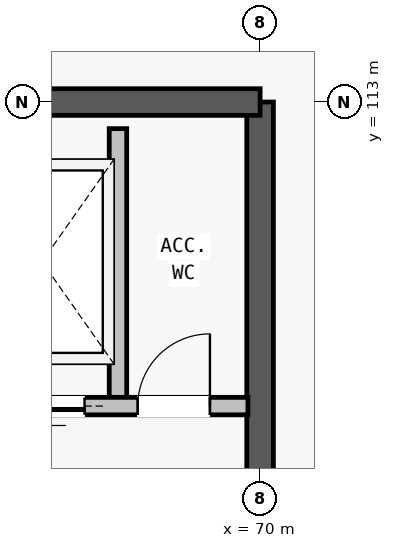
"""IFC4 building model, lengths in metres.
Left out: names, types, materials, properties, quantities, classifications, styles, units other than length and angle.
Written with IfcOpenShell. Run it as: python <this file> out.ifc"""

import sys

from ifc_helpers import new_model, si_unit, direction, frame, frame_2d, origin, place, context, subcontext, project, spatial, rectangle, extrude, element, fill, save


model = new_model("IFC4")
c1 = context("Model", 3, precision=1e-05, world=origin(), true_north=direction((0.0, 1.0)))
c2 = subcontext(c1, "Body", "Model", "MODEL_VIEW")
j1 = project(units=[si_unit("LENGTHUNIT", "METRE"), si_unit("PLANEANGLEUNIT", "RADIAN")], contexts=[c1])
p1 = place(None, origin())
s1 = spatial("IfcSite", under=j1, at=p1, CompositionType="ELEMENT")
p2 = place(p1, origin())
s2 = spatial("IfcBuilding", under=s1, at=p2, CompositionType="ELEMENT")
p3 = place(p2, frame((0.0, 0.0, 17.3)))
s3 = spatial("IfcBuildingStorey", under=s2, at=p3, CompositionType="ELEMENT", Elevation=17.3)
p4 = place(p3, frame((70.0, 104.0, 0.0), z_axis=(0.0, 0.0, 1.0), x_axis=(0.0, 1.0, 0.0)))
e1 = element("IfcWall", 1, at=p4, inside=s3, PredefinedType="SHEAR", context=c2, shape_type="SweptSolid", body=[
    extrude(rectangle(XDim=9.0, YDim=0.35, at=frame_2d((4.5, 0.0))), origin(), (0.0, 0.0, 1.0), 3.62),
])
p5 = place(p4, frame((1.4, 0.0, 0.0)))
e2 = element("IfcOpeningElement", 2, at=p5, cuts=e1, PredefinedType="OPENING", context=c2, shape_type="SweptSolid", body=[
    extrude(rectangle(XDim=1.9, YDim=2.3, at=frame_2d((0.95, 1.15))), frame((0.0, 0.185, 0.0), z_axis=(0.0, -1.0, 0.0), x_axis=(1.0, 0.0, 0.0)), (0.0, 0.0, 1.0), 0.37),
])
p6 = place(p3, frame((70.0, 113.0, 0.0), z_axis=(0.0, 0.0, 1.0), x_axis=(-1.0, 0.0, 0.0)))
e3 = element("IfcWall", 3, at=p6, inside=s3, PredefinedType="SHEAR", context=c2, shape_type="SweptSolid", body=[
    extrude(rectangle(XDim=8.0, YDim=0.35, at=frame_2d((4.0, 0.0))), origin(), (0.0, 0.0, 1.0), 3.62),
])
p7 = place(p3, frame((68.13, 109.0, 0.0), z_axis=(0.0, 0.0, 1.0), x_axis=(0.0, 1.0, 0.0)))
e4 = element("IfcWall", 4, at=p7, inside=s3, PredefinedType="PARTITIONING", context=c2, shape_type="SweptSolid", body=[
    extrude(rectangle(XDim=3.65, YDim=0.23, at=frame_2d((1.825, 0.0))), origin(), (0.0, 0.0, 1.0), 2.48),
])
p8 = place(p3, frame((66.21, 109.0, 0.0), z_axis=(0.0, 0.0, 1.0), x_axis=(1.0, 0.0, 0.0)))
e5 = element("IfcWall", 5, at=p8, inside=s3, PredefinedType="PARTITIONING", context=c2, shape_type="SweptSolid", body=[
    extrude(rectangle(XDim=3.63, YDim=0.23, at=frame_2d((1.815, 0.0))), origin(), (0.0, 0.0, 1.0), 2.48),
])
p9 = place(p8, frame((0.38, 0.0, 0.0)))
e6 = element("IfcOpeningElement", 6, at=p9, cuts=e5, PredefinedType="OPENING", context=c2, shape_type="SweptSolid", body=[
    extrude(rectangle(XDim=1.1, YDim=2.15, at=frame_2d((0.55, 1.075))), frame((0.0, 0.125, 0.0), z_axis=(0.0, -1.0, 0.0), x_axis=(1.0, 0.0, 0.0)), (0.0, 0.0, 1.0), 0.25),
])
p10 = place(p8, frame((2.18, 0.0, 0.0)))
e7 = element("IfcOpeningElement", 7, at=p10, cuts=e5, PredefinedType="OPENING", context=c2, shape_type="SweptSolid", body=[
    extrude(rectangle(XDim=0.95, YDim=2.1, at=frame_2d((0.475, 1.05))), frame((0.0, 0.125, 0.0), z_axis=(0.0, -1.0, 0.0), x_axis=(1.0, 0.0, 0.0)), (0.0, 0.0, 1.0), 0.25),
])
p11 = place(p9, origin())
e8 = element("IfcDoor", 8, at=p11, inside=s3, OperationType="SLIDING_TO_LEFT", PredefinedType="DOOR", context=c2, shape_type="SweptSolid", body=[
    extrude(rectangle(XDim=1.1, YDim=2.15, at=frame_2d((0.55, 1.075))), frame((0.0, 0.025, 0.0), z_axis=(0.0, -1.0, 0.0), x_axis=(1.0, 0.0, 0.0)), (0.0, 0.0, 1.0), 0.05),
])
fill(e6, e8)
p12 = place(p10, origin())
e9 = element("IfcDoor", 9, at=p12, inside=s3, OperationType="SINGLE_SWING_RIGHT", PredefinedType="DOOR", context=c2, shape_type="SweptSolid", body=[
    extrude(rectangle(XDim=0.95, YDim=2.1, at=frame_2d((0.475, 1.05))), frame((0.0, 0.025, 0.0), z_axis=(0.0, -1.0, 0.0), x_axis=(1.0, 0.0, 0.0)), (0.0, 0.0, 1.0), 0.05),
])
fill(e7, e9)
save(model, sys.argv[1])
